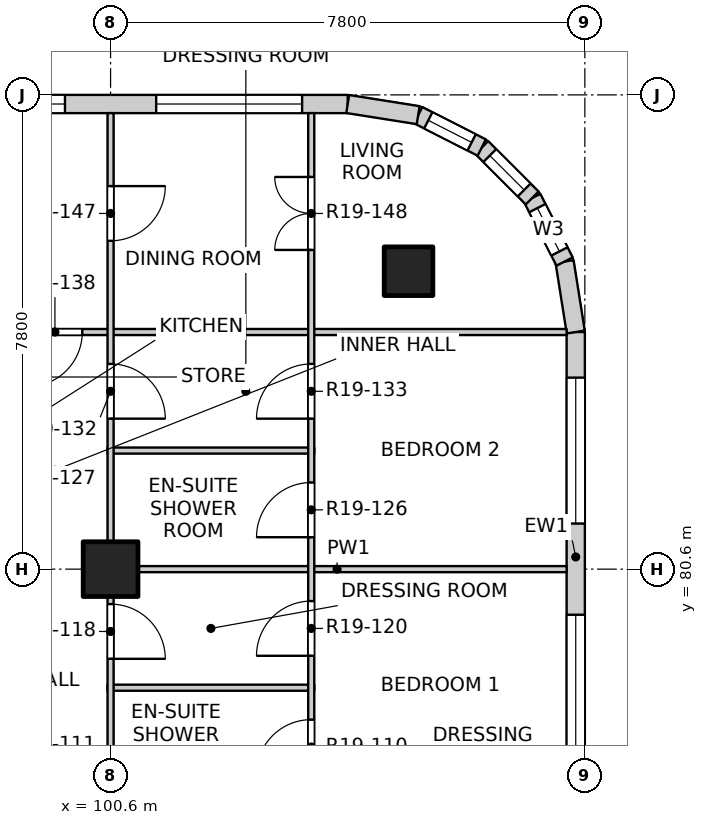
"""IFC4 building model, lengths in metres.
Left out: names, types, materials, properties, quantities, classifications, styles, units other than length and angle.
Written with IfcOpenShell. Run it as: python <this file> out.ifc"""

import sys

from ifc_helpers import new_model, si_unit, direction, frame, frame_2d, origin, origin_2d, place, context, subcontext, project, spatial, rectangle, extrude, element, fill, save


model = new_model("IFC4")
c1 = context("Model", 3, precision=1e-05, world=origin(), true_north=direction((0.0, 1.0)))
c2 = subcontext(c1, "Body", "Model", "MODEL_VIEW")
j1 = project(units=[si_unit("LENGTHUNIT", "METRE"), si_unit("PLANEANGLEUNIT", "RADIAN")], contexts=[c1])
p1 = place(None, origin())
s1 = spatial("IfcSite", under=j1, at=p1, CompositionType="ELEMENT")
p2 = place(p1, origin())
s2 = spatial("IfcBuilding", under=s1, at=p2, CompositionType="ELEMENT")
p3 = place(p2, frame((0.0, 0.0, 197.3)))
s3 = spatial("IfcBuildingStorey", under=s2, at=p3, CompositionType="ELEMENT", Elevation=197.3)
p4 = place(p3, frame((105.5, 85.5, -0.3), z_axis=(0.0, 0.0, 1.0), x_axis=(1.0, 0.0, 0.0)))
e1 = element("IfcColumn", 1, at=p4, inside=s3, PredefinedType="COLUMN", context=c2, shape_type="SweptSolid", body=[
    extrude(rectangle(XDim=0.8, YDim=0.8, at=origin_2d()), origin(), (0.0, 0.0, 1.0), 3.45),
])
p5 = place(p3, frame((100.6, 80.6, -0.3), z_axis=(0.0, 0.0, 1.0), x_axis=(1.0, 0.0, 0.0)))
e2 = element("IfcColumn", 2, at=p5, inside=s3, PredefinedType="COLUMN", context=c2, shape_type="SweptSolid", body=[
    extrude(rectangle(XDim=0.9, YDim=0.9, at=origin_2d()), origin(), (0.0, 0.0, 1.0), 3.45),
])
p6 = place(p3, frame((108.25, 77.1, 0.0), z_axis=(0.0, 0.0, 1.0), x_axis=(0.0, 1.0, 0.0)))
e3 = element("IfcWall", 3, at=p6, inside=s3, PredefinedType="SOLIDWALL", context=c2, shape_type="SweptSolid", body=[
    extrude(rectangle(XDim=7.4, YDim=0.3, at=frame_2d((3.7, 0.0))), origin(), (0.0, 0.0, 1.0), 2.7),
])
p7 = place(p6, frame((0.35, 0.0, 0.9)))
e4 = element("IfcOpeningElement", 4, at=p7, cuts=e3, PredefinedType="OPENING", context=c2, shape_type="SweptSolid", body=[
    extrude(rectangle(XDim=2.4, YDim=1.8, at=frame_2d((1.2, 0.9))), frame((0.0, 0.16, 0.0), z_axis=(0.0, -1.0, 0.0), x_axis=(1.0, 0.0, 0.0)), (0.0, 0.0, 1.0), 0.32),
])
p8 = place(p6, frame((4.25, 0.0, 0.9)))
e5 = element("IfcOpeningElement", 5, at=p8, cuts=e3, PredefinedType="OPENING", context=c2, shape_type="SweptSolid", body=[
    extrude(rectangle(XDim=2.4, YDim=1.8, at=frame_2d((1.2, 0.9))), frame((0.0, 0.16, 0.0), z_axis=(0.0, -1.0, 0.0), x_axis=(1.0, 0.0, 0.0)), (0.0, 0.0, 1.0), 0.32),
])
p9 = place(p3, frame((97.1, 88.25, 0.0), z_axis=(0.0, 0.0, 1.0), x_axis=(1.0, 0.0, 0.0)))
e6 = element("IfcWall", 6, at=p9, inside=s3, PredefinedType="SOLIDWALL", context=c2, shape_type="SweptSolid", body=[
    extrude(rectangle(XDim=7.4, YDim=0.3, at=frame_2d((3.7, 0.0))), origin(), (0.0, 0.0, 1.0), 2.7),
])
p10 = place(p9, frame((0.35, 0.0, 0.9)))
e7 = element("IfcOpeningElement", 7, at=p10, cuts=e6, PredefinedType="OPENING", context=c2, shape_type="SweptSolid", body=[
    extrude(rectangle(XDim=2.4, YDim=1.8, at=frame_2d((1.2, 0.9))), frame((0.0, 0.16, 0.0), z_axis=(0.0, -1.0, 0.0), x_axis=(1.0, 0.0, 0.0)), (0.0, 0.0, 1.0), 0.32),
])
p11 = place(p9, frame((4.25, 0.0, 0.9)))
e8 = element("IfcOpeningElement", 8, at=p11, cuts=e6, PredefinedType="OPENING", context=c2, shape_type="SweptSolid", body=[
    extrude(rectangle(XDim=2.4, YDim=1.8, at=frame_2d((1.2, 0.9))), frame((0.0, 0.16, 0.0), z_axis=(0.0, -1.0, 0.0), x_axis=(1.0, 0.0, 0.0)), (0.0, 0.0, 1.0), 0.32),
])
p12 = place(p3, frame((108.25, 84.5, 0.0), z_axis=(0.0, 0.0, 1.0), x_axis=(-0.156496880861, 0.987678452879, 0.0)))
e9 = element("IfcWall", 9, at=p12, inside=s3, PredefinedType="SOLIDWALL", context=c2, shape_type="SweptSolid", body=[
    extrude(rectangle(XDim=1.173, YDim=0.3, at=frame_2d((0.586, 0.0))), origin(), (0.0, 0.0, 1.0), 2.7),
])
p13 = place(p3, frame((108.066, 85.659, 0.0), z_axis=(0.0, 0.0, 1.0), x_axis=(-0.454025524128, 0.890988677504, 0.0)))
e10 = element("IfcWall", 10, at=p13, inside=s3, PredefinedType="SOLIDWALL", context=c2, shape_type="SweptSolid", body=[
    extrude(rectangle(XDim=1.173, YDim=0.3, at=frame_2d((0.587, 0.0))), origin(), (0.0, 0.0, 1.0), 2.7),
])
p14 = place(p13, frame((0.187, 0.0, 0.9)))
e11 = element("IfcOpeningElement", 11, at=p14, cuts=e10, PredefinedType="OPENING", context=c2, shape_type="SweptSolid", body=[
    extrude(rectangle(XDim=0.8, YDim=1.2, at=frame_2d((0.4, 0.6))), frame((0.0, 0.16, 0.0), z_axis=(0.0, -1.0, 0.0), x_axis=(1.0, 0.0, 0.0)), (0.0, 0.0, 1.0), 0.32),
])
p15 = place(p3, frame((107.534, 86.704, 0.0), z_axis=(0.0, 0.0, 1.0), x_axis=(-0.707106781187, 0.707106781187, 0.0)))
e12 = element("IfcWall", 12, at=p15, inside=s3, PredefinedType="SOLIDWALL", context=c2, shape_type="SweptSolid", body=[
    extrude(rectangle(XDim=1.173, YDim=0.3, at=frame_2d((0.586, 0.0))), origin(), (0.0, 0.0, 1.0), 2.7),
])
p16 = place(p15, frame((0.187, 0.0, 0.9)))
e13 = element("IfcOpeningElement", 13, at=p16, cuts=e12, PredefinedType="OPENING", context=c2, shape_type="SweptSolid", body=[
    extrude(rectangle(XDim=0.8, YDim=1.2, at=frame_2d((0.4, 0.6))), frame((0.0, 0.16, 0.0), z_axis=(0.0, -1.0, 0.0), x_axis=(1.0, 0.0, 0.0)), (0.0, 0.0, 1.0), 0.32),
])
p17 = place(p3, frame((106.704, 87.534, 0.0), z_axis=(0.0, 0.0, 1.0), x_axis=(-0.890988677504, 0.454025524128, 0.0)))
e14 = element("IfcWall", 14, at=p17, inside=s3, PredefinedType="SOLIDWALL", context=c2, shape_type="SweptSolid", body=[
    extrude(rectangle(XDim=1.173, YDim=0.3, at=frame_2d((0.587, 0.0))), origin(), (0.0, 0.0, 1.0), 2.7),
])
p18 = place(p17, frame((0.187, 0.0, 0.9)))
e15 = element("IfcOpeningElement", 15, at=p18, cuts=e14, PredefinedType="OPENING", context=c2, shape_type="SweptSolid", body=[
    extrude(rectangle(XDim=0.8, YDim=1.2, at=frame_2d((0.4, 0.6))), frame((0.0, 0.16, 0.0), z_axis=(0.0, -1.0, 0.0), x_axis=(1.0, 0.0, 0.0)), (0.0, 0.0, 1.0), 0.32),
])
p19 = place(p3, frame((105.659, 88.066, 0.0), z_axis=(0.0, 0.0, 1.0), x_axis=(-0.987678452879, 0.156496880861, 0.0)))
e16 = element("IfcWall", 16, at=p19, inside=s3, PredefinedType="SOLIDWALL", context=c2, shape_type="SweptSolid", body=[
    extrude(rectangle(XDim=1.173, YDim=0.3, at=frame_2d((0.586, 0.0))), origin(), (0.0, 0.0, 1.0), 2.7),
])
p20 = place(p3, frame((100.55, 78.65, 0.0), z_axis=(0.0, 0.0, 1.0), x_axis=(1.0, 0.0, 0.0)))
e17 = element("IfcWall", 17, at=p20, inside=s3, PredefinedType="PARTITIONING", context=c2, shape_type="SweptSolid", body=[
    extrude(rectangle(XDim=3.4, YDim=0.1, at=frame_2d((1.7, 0.0))), origin(), (0.0, 0.0, 1.0), 3.15),
])
p21 = place(p3, frame((100.55, 80.6, 0.0), z_axis=(0.0, 0.0, 1.0), x_axis=(1.0, 0.0, 0.0)))
e18 = element("IfcWall", 18, at=p21, inside=s3, PredefinedType="PARTITIONING", context=c2, shape_type="SweptSolid", body=[
    extrude(rectangle(XDim=7.55, YDim=0.1, at=frame_2d((3.775, 0.0))), origin(), (0.0, 0.0, 1.0), 3.15),
])
p22 = place(p3, frame((100.55, 82.55, 0.0), z_axis=(0.0, 0.0, 1.0), x_axis=(1.0, 0.0, 0.0)))
e19 = element("IfcWall", 19, at=p22, inside=s3, PredefinedType="PARTITIONING", context=c2, shape_type="SweptSolid", body=[
    extrude(rectangle(XDim=3.4, YDim=0.1, at=frame_2d((1.7, 0.0))), origin(), (0.0, 0.0, 1.0), 3.15),
])
p23 = place(p3, frame((96.6, 84.5, 0.0), z_axis=(0.0, 0.0, 1.0), x_axis=(1.0, 0.0, 0.0)))
e20 = element("IfcWall", 20, at=p23, inside=s3, PredefinedType="PARTITIONING", context=c2, shape_type="SweptSolid", body=[
    extrude(rectangle(XDim=11.5, YDim=0.1, at=frame_2d((5.75, 0.0))), origin(), (0.0, 0.0, 1.0), 3.15),
])
p24 = place(p23, frame((2.635, 0.0, 0.0)))
e21 = element("IfcOpeningElement", 21, at=p24, cuts=e20, PredefinedType="OPENING", context=c2, shape_type="SweptSolid", body=[
    extrude(rectangle(XDim=0.9, YDim=2.1, at=frame_2d((0.45, 1.05))), frame((0.0, 0.06, 0.0), z_axis=(0.0, -1.0, 0.0), x_axis=(1.0, 0.0, 0.0)), (0.0, 0.0, 1.0), 0.12),
])
p25 = place(p3, frame((100.6, 41.9, 0.0), z_axis=(0.0, 0.0, 1.0), x_axis=(0.0, 1.0, 0.0)))
e22 = element("IfcWall", 22, at=p25, inside=s3, PredefinedType="PARTITIONING", context=c2, shape_type="SweptSolid", body=[
    extrude(rectangle(XDim=46.2, YDim=0.1, at=frame_2d((23.1, 0.0))), origin(), (0.0, 0.0, 1.0), 3.15),
])
p26 = place(p25, frame((1.2, 0.0, 0.0)))
e23 = element("IfcOpeningElement", 23, at=p26, cuts=e22, PredefinedType="OPENING", context=c2, shape_type="SweptSolid", body=[
    extrude(rectangle(XDim=0.9, YDim=2.1, at=frame_2d((0.45, 1.05))), frame((0.0, 0.06, 0.0), z_axis=(0.0, -1.0, 0.0), x_axis=(1.0, 0.0, 0.0)), (0.0, 0.0, 1.0), 0.12),
])
p27 = place(p25, frame((5.1, 0.0, 0.0)))
e24 = element("IfcOpeningElement", 24, at=p27, cuts=e22, PredefinedType="OPENING", context=c2, shape_type="SweptSolid", body=[
    extrude(rectangle(XDim=0.9, YDim=2.1, at=frame_2d((0.45, 1.05))), frame((0.0, 0.06, 0.0), z_axis=(0.0, -1.0, 0.0), x_axis=(1.0, 0.0, 0.0)), (0.0, 0.0, 1.0), 0.12),
])
p28 = place(p25, frame((9.975, 0.0, 0.0)))
e25 = element("IfcOpeningElement", 25, at=p28, cuts=e22, PredefinedType="OPENING", context=c2, shape_type="SweptSolid", body=[
    extrude(rectangle(XDim=0.9, YDim=2.1, at=frame_2d((0.45, 1.05))), frame((0.0, 0.06, 0.0), z_axis=(0.0, -1.0, 0.0), x_axis=(1.0, 0.0, 0.0)), (0.0, 0.0, 1.0), 0.12),
])
p29 = place(p25, frame((12.9, 0.0, 0.0)))
e26 = element("IfcOpeningElement", 26, at=p29, cuts=e22, PredefinedType="OPENING", context=c2, shape_type="SweptSolid", body=[
    extrude(rectangle(XDim=0.9, YDim=2.1, at=frame_2d((0.45, 1.05))), frame((0.0, 0.06, 0.0), z_axis=(0.0, -1.0, 0.0), x_axis=(1.0, 0.0, 0.0)), (0.0, 0.0, 1.0), 0.12),
])
p30 = place(p25, frame((17.775, 0.0, 0.0)))
e27 = element("IfcOpeningElement", 27, at=p30, cuts=e22, PredefinedType="OPENING", context=c2, shape_type="SweptSolid", body=[
    extrude(rectangle(XDim=0.9, YDim=2.1, at=frame_2d((0.45, 1.05))), frame((0.0, 0.06, 0.0), z_axis=(0.0, -1.0, 0.0), x_axis=(1.0, 0.0, 0.0)), (0.0, 0.0, 1.0), 0.12),
])
p31 = place(p25, frame((20.7, 0.0, 0.0)))
e28 = element("IfcOpeningElement", 28, at=p31, cuts=e22, PredefinedType="OPENING", context=c2, shape_type="SweptSolid", body=[
    extrude(rectangle(XDim=0.9, YDim=2.1, at=frame_2d((0.45, 1.05))), frame((0.0, 0.06, 0.0), z_axis=(0.0, -1.0, 0.0), x_axis=(1.0, 0.0, 0.0)), (0.0, 0.0, 1.0), 0.12),
])
p32 = place(p25, frame((25.575, 0.0, 0.0)))
e29 = element("IfcOpeningElement", 29, at=p32, cuts=e22, PredefinedType="OPENING", context=c2, shape_type="SweptSolid", body=[
    extrude(rectangle(XDim=0.9, YDim=2.1, at=frame_2d((0.45, 1.05))), frame((0.0, 0.06, 0.0), z_axis=(0.0, -1.0, 0.0), x_axis=(1.0, 0.0, 0.0)), (0.0, 0.0, 1.0), 0.12),
])
p33 = place(p25, frame((28.5, 0.0, 0.0)))
e30 = element("IfcOpeningElement", 30, at=p33, cuts=e22, PredefinedType="OPENING", context=c2, shape_type="SweptSolid", body=[
    extrude(rectangle(XDim=0.9, YDim=2.1, at=frame_2d((0.45, 1.05))), frame((0.0, 0.06, 0.0), z_axis=(0.0, -1.0, 0.0), x_axis=(1.0, 0.0, 0.0)), (0.0, 0.0, 1.0), 0.12),
])
p34 = place(p25, frame((33.375, 0.0, 0.0)))
e31 = element("IfcOpeningElement", 31, at=p34, cuts=e22, PredefinedType="OPENING", context=c2, shape_type="SweptSolid", body=[
    extrude(rectangle(XDim=0.9, YDim=2.1, at=frame_2d((0.45, 1.05))), frame((0.0, 0.06, 0.0), z_axis=(0.0, -1.0, 0.0), x_axis=(1.0, 0.0, 0.0)), (0.0, 0.0, 1.0), 0.12),
])
p35 = place(p25, frame((37.225, 0.0, 0.0)))
e32 = element("IfcOpeningElement", 32, at=p35, cuts=e22, PredefinedType="OPENING", context=c2, shape_type="SweptSolid", body=[
    extrude(rectangle(XDim=0.9, YDim=2.1, at=frame_2d((0.45, 1.05))), frame((0.0, 0.06, 0.0), z_axis=(0.0, -1.0, 0.0), x_axis=(1.0, 0.0, 0.0)), (0.0, 0.0, 1.0), 0.12),
])
p36 = place(p25, frame((41.175, 0.0, 0.0)))
e33 = element("IfcOpeningElement", 33, at=p36, cuts=e22, PredefinedType="OPENING", context=c2, shape_type="SweptSolid", body=[
    extrude(rectangle(XDim=0.9, YDim=2.1, at=frame_2d((0.45, 1.05))), frame((0.0, 0.06, 0.0), z_axis=(0.0, -1.0, 0.0), x_axis=(1.0, 0.0, 0.0)), (0.0, 0.0, 1.0), 0.12),
])
p37 = place(p25, frame((44.1, 0.0, 0.0)))
e34 = element("IfcOpeningElement", 34, at=p37, cuts=e22, PredefinedType="OPENING", context=c2, shape_type="SweptSolid", body=[
    extrude(rectangle(XDim=0.9, YDim=2.1, at=frame_2d((0.45, 1.05))), frame((0.0, 0.06, 0.0), z_axis=(0.0, -1.0, 0.0), x_axis=(1.0, 0.0, 0.0)), (0.0, 0.0, 1.0), 0.12),
])
p38 = place(p3, frame((103.9, 69.0, 0.0), z_axis=(0.0, 0.0, 1.0), x_axis=(0.0, 1.0, 0.0)))
e35 = element("IfcWall", 35, at=p38, inside=s3, PredefinedType="PARTITIONING", context=c2, shape_type="SweptSolid", body=[
    extrude(rectangle(XDim=19.1, YDim=0.1, at=frame_2d((9.55, 0.0))), origin(), (0.0, 0.0, 1.0), 3.15),
])
p39 = place(p38, frame((1.25, 0.0, 0.0)))
e36 = element("IfcOpeningElement", 36, at=p39, cuts=e35, PredefinedType="OPENING", context=c2, shape_type="SweptSolid", body=[
    extrude(rectangle(XDim=1.2, YDim=2.1, at=frame_2d((0.6, 1.05))), frame((0.0, 0.06, 0.0), z_axis=(0.0, -1.0, 0.0), x_axis=(1.0, 0.0, 0.0)), (0.0, 0.0, 1.0), 0.12),
])
p40 = place(p38, frame((4.325, 0.0, 0.0)))
e37 = element("IfcOpeningElement", 37, at=p40, cuts=e35, PredefinedType="OPENING", context=c2, shape_type="SweptSolid", body=[
    extrude(rectangle(XDim=0.9, YDim=2.1, at=frame_2d((0.45, 1.05))), frame((0.0, 0.06, 0.0), z_axis=(0.0, -1.0, 0.0), x_axis=(1.0, 0.0, 0.0)), (0.0, 0.0, 1.0), 0.12),
])
p41 = place(p38, frame((6.275, 0.0, 0.0)))
e38 = element("IfcOpeningElement", 38, at=p41, cuts=e35, PredefinedType="OPENING", context=c2, shape_type="SweptSolid", body=[
    extrude(rectangle(XDim=0.9, YDim=2.1, at=frame_2d((0.45, 1.05))), frame((0.0, 0.06, 0.0), z_axis=(0.0, -1.0, 0.0), x_axis=(1.0, 0.0, 0.0)), (0.0, 0.0, 1.0), 0.12),
])
p42 = place(p38, frame((8.225, 0.0, 0.0)))
e39 = element("IfcOpeningElement", 39, at=p42, cuts=e35, PredefinedType="OPENING", context=c2, shape_type="SweptSolid", body=[
    extrude(rectangle(XDim=0.9, YDim=2.1, at=frame_2d((0.45, 1.05))), frame((0.0, 0.06, 0.0), z_axis=(0.0, -1.0, 0.0), x_axis=(1.0, 0.0, 0.0)), (0.0, 0.0, 1.0), 0.12),
])
p43 = place(p38, frame((10.175, 0.0, 0.0)))
e40 = element("IfcOpeningElement", 40, at=p43, cuts=e35, PredefinedType="OPENING", context=c2, shape_type="SweptSolid", body=[
    extrude(rectangle(XDim=0.9, YDim=2.1, at=frame_2d((0.45, 1.05))), frame((0.0, 0.06, 0.0), z_axis=(0.0, -1.0, 0.0), x_axis=(1.0, 0.0, 0.0)), (0.0, 0.0, 1.0), 0.12),
])
p44 = place(p38, frame((12.125, 0.0, 0.0)))
e41 = element("IfcOpeningElement", 41, at=p44, cuts=e35, PredefinedType="OPENING", context=c2, shape_type="SweptSolid", body=[
    extrude(rectangle(XDim=0.9, YDim=2.1, at=frame_2d((0.45, 1.05))), frame((0.0, 0.06, 0.0), z_axis=(0.0, -1.0, 0.0), x_axis=(1.0, 0.0, 0.0)), (0.0, 0.0, 1.0), 0.12),
])
p45 = place(p38, frame((14.075, 0.0, 0.0)))
e42 = element("IfcOpeningElement", 42, at=p45, cuts=e35, PredefinedType="OPENING", context=c2, shape_type="SweptSolid", body=[
    extrude(rectangle(XDim=0.9, YDim=2.1, at=frame_2d((0.45, 1.05))), frame((0.0, 0.06, 0.0), z_axis=(0.0, -1.0, 0.0), x_axis=(1.0, 0.0, 0.0)), (0.0, 0.0, 1.0), 0.12),
])
p46 = place(p38, frame((16.85, 0.0, 0.0)))
e43 = element("IfcOpeningElement", 43, at=p46, cuts=e35, PredefinedType="OPENING", context=c2, shape_type="SweptSolid", body=[
    extrude(rectangle(XDim=1.2, YDim=2.1, at=frame_2d((0.6, 1.05))), frame((0.0, 0.06, 0.0), z_axis=(0.0, -1.0, 0.0), x_axis=(1.0, 0.0, 0.0)), (0.0, 0.0, 1.0), 0.12),
])
p47 = place(p7, origin())
e44 = element("IfcWindow", 44, at=p47, inside=s3, PartitioningType="DOUBLE_PANEL_VERTICAL", PredefinedType="WINDOW", context=c2, shape_type="SweptSolid", body=[
    extrude(rectangle(XDim=2.4, YDim=1.8, at=frame_2d((1.2, 0.9))), frame((0.0, 0.03, 0.0), z_axis=(0.0, -1.0, 0.0), x_axis=(1.0, 0.0, 0.0)), (0.0, 0.0, 1.0), 0.06),
])
fill(e4, e44)
p48 = place(p8, origin())
e45 = element("IfcWindow", 45, at=p48, inside=s3, PartitioningType="DOUBLE_PANEL_VERTICAL", PredefinedType="WINDOW", context=c2, shape_type="SweptSolid", body=[
    extrude(rectangle(XDim=2.4, YDim=1.8, at=frame_2d((1.2, 0.9))), frame((0.0, 0.03, 0.0), z_axis=(0.0, -1.0, 0.0), x_axis=(1.0, 0.0, 0.0)), (0.0, 0.0, 1.0), 0.06),
])
fill(e5, e45)
p49 = place(p10, origin())
e46 = element("IfcWindow", 46, at=p49, inside=s3, PartitioningType="DOUBLE_PANEL_VERTICAL", PredefinedType="WINDOW", context=c2, shape_type="SweptSolid", body=[
    extrude(rectangle(XDim=2.4, YDim=1.8, at=frame_2d((1.2, 0.9))), frame((0.0, 0.03, 0.0), z_axis=(0.0, -1.0, 0.0), x_axis=(1.0, 0.0, 0.0)), (0.0, 0.0, 1.0), 0.06),
])
fill(e7, e46)
p50 = place(p11, origin())
e47 = element("IfcWindow", 47, at=p50, inside=s3, PartitioningType="DOUBLE_PANEL_VERTICAL", PredefinedType="WINDOW", context=c2, shape_type="SweptSolid", body=[
    extrude(rectangle(XDim=2.4, YDim=1.8, at=frame_2d((1.2, 0.9))), frame((0.0, 0.03, 0.0), z_axis=(0.0, -1.0, 0.0), x_axis=(1.0, 0.0, 0.0)), (0.0, 0.0, 1.0), 0.06),
])
fill(e8, e47)
p51 = place(p14, origin())
e48 = element("IfcWindow", 48, at=p51, inside=s3, PartitioningType="SINGLE_PANEL", PredefinedType="WINDOW", context=c2, shape_type="SweptSolid", body=[
    extrude(rectangle(XDim=0.8, YDim=1.2, at=frame_2d((0.4, 0.6))), frame((0.0, 0.03, 0.0), z_axis=(0.0, -1.0, 0.0), x_axis=(1.0, 0.0, 0.0)), (0.0, 0.0, 1.0), 0.06),
])
fill(e11, e48)
p52 = place(p16, origin())
e49 = element("IfcWindow", 49, at=p52, inside=s3, PartitioningType="SINGLE_PANEL", PredefinedType="WINDOW", context=c2, shape_type="SweptSolid", body=[
    extrude(rectangle(XDim=0.8, YDim=1.2, at=frame_2d((0.4, 0.6))), frame((0.0, 0.03, 0.0), z_axis=(0.0, -1.0, 0.0), x_axis=(1.0, 0.0, 0.0)), (0.0, 0.0, 1.0), 0.06),
])
fill(e13, e49)
p53 = place(p18, origin())
e50 = element("IfcWindow", 50, at=p53, inside=s3, PartitioningType="SINGLE_PANEL", PredefinedType="WINDOW", context=c2, shape_type="SweptSolid", body=[
    extrude(rectangle(XDim=0.8, YDim=1.2, at=frame_2d((0.4, 0.6))), frame((0.0, 0.03, 0.0), z_axis=(0.0, -1.0, 0.0), x_axis=(1.0, 0.0, 0.0)), (0.0, 0.0, 1.0), 0.06),
])
fill(e15, e50)
p54 = place(p42, origin())
e51 = element("IfcDoor", 51, at=p54, inside=s3, OperationType="SINGLE_SWING_LEFT", PredefinedType="DOOR", context=c2, shape_type="SweptSolid", body=[
    extrude(rectangle(XDim=0.9, YDim=2.1, at=frame_2d((0.45, 1.05))), frame((0.0, 0.025, 0.0), z_axis=(0.0, -1.0, 0.0), x_axis=(1.0, 0.0, 0.0)), (0.0, 0.0, 1.0), 0.05),
])
fill(e39, e51)
p55 = place(p35, origin())
e52 = element("IfcDoor", 52, at=p55, inside=s3, OperationType="SINGLE_SWING_RIGHT", PredefinedType="DOOR", context=c2, shape_type="SweptSolid", body=[
    extrude(rectangle(XDim=0.9, YDim=2.1, at=frame_2d((0.45, 1.05))), frame((0.0, 0.025, 0.0), z_axis=(0.0, -1.0, 0.0), x_axis=(1.0, 0.0, 0.0)), (0.0, 0.0, 1.0), 0.05),
])
fill(e32, e52)
p56 = place(p43, origin())
e53 = element("IfcDoor", 53, at=p56, inside=s3, OperationType="SINGLE_SWING_LEFT", PredefinedType="DOOR", context=c2, shape_type="SweptSolid", body=[
    extrude(rectangle(XDim=0.9, YDim=2.1, at=frame_2d((0.45, 1.05))), frame((0.0, 0.025, 0.0), z_axis=(0.0, -1.0, 0.0), x_axis=(1.0, 0.0, 0.0)), (0.0, 0.0, 1.0), 0.05),
])
fill(e40, e53)
p57 = place(p44, origin())
e54 = element("IfcDoor", 54, at=p57, inside=s3, OperationType="SINGLE_SWING_LEFT", PredefinedType="DOOR", context=c2, shape_type="SweptSolid", body=[
    extrude(rectangle(XDim=0.9, YDim=2.1, at=frame_2d((0.45, 1.05))), frame((0.0, 0.025, 0.0), z_axis=(0.0, -1.0, 0.0), x_axis=(1.0, 0.0, 0.0)), (0.0, 0.0, 1.0), 0.05),
])
fill(e41, e54)
p58 = place(p36, origin())
e55 = element("IfcDoor", 55, at=p58, inside=s3, OperationType="SINGLE_SWING_RIGHT", PredefinedType="DOOR", context=c2, shape_type="SweptSolid", body=[
    extrude(rectangle(XDim=0.9, YDim=2.1, at=frame_2d((0.45, 1.05))), frame((0.0, 0.025, 0.0), z_axis=(0.0, -1.0, 0.0), x_axis=(1.0, 0.0, 0.0)), (0.0, 0.0, 1.0), 0.05),
])
fill(e33, e55)
p59 = place(p45, origin())
e56 = element("IfcDoor", 56, at=p59, inside=s3, OperationType="SINGLE_SWING_LEFT", PredefinedType="DOOR", context=c2, shape_type="SweptSolid", body=[
    extrude(rectangle(XDim=0.9, YDim=2.1, at=frame_2d((0.45, 1.05))), frame((0.0, 0.025, 0.0), z_axis=(0.0, -1.0, 0.0), x_axis=(1.0, 0.0, 0.0)), (0.0, 0.0, 1.0), 0.05),
])
fill(e42, e56)
p60 = place(p24, origin())
e57 = element("IfcDoor", 57, at=p60, inside=s3, OperationType="SINGLE_SWING_RIGHT", PredefinedType="DOOR", context=c2, shape_type="SweptSolid", body=[
    extrude(rectangle(XDim=0.9, YDim=2.1, at=frame_2d((0.45, 1.05))), frame((0.0, 0.025, 0.0), z_axis=(0.0, -1.0, 0.0), x_axis=(1.0, 0.0, 0.0)), (0.0, 0.0, 1.0), 0.05),
])
fill(e21, e57)
p61 = place(p37, origin())
e58 = element("IfcDoor", 58, at=p61, inside=s3, OperationType="SINGLE_SWING_LEFT", PredefinedType="DOOR", context=c2, shape_type="SweptSolid", body=[
    extrude(rectangle(XDim=0.9, YDim=2.1, at=frame_2d((0.45, 1.05))), frame((0.0, 0.025, 0.0), z_axis=(0.0, -1.0, 0.0), x_axis=(1.0, 0.0, 0.0)), (0.0, 0.0, 1.0), 0.05),
])
fill(e34, e58)
p62 = place(p46, origin())
e59 = element("IfcDoor", 59, at=p62, inside=s3, OperationType="DOUBLE_DOOR_SINGLE_SWING", PredefinedType="DOOR", context=c2, shape_type="SweptSolid", body=[
    extrude(rectangle(XDim=1.2, YDim=2.1, at=frame_2d((0.6, 1.05))), frame((0.0, 0.025, 0.0), z_axis=(0.0, -1.0, 0.0), x_axis=(1.0, 0.0, 0.0)), (0.0, 0.0, 1.0), 0.05),
])
fill(e43, e59)
save(model, sys.argv[1])
